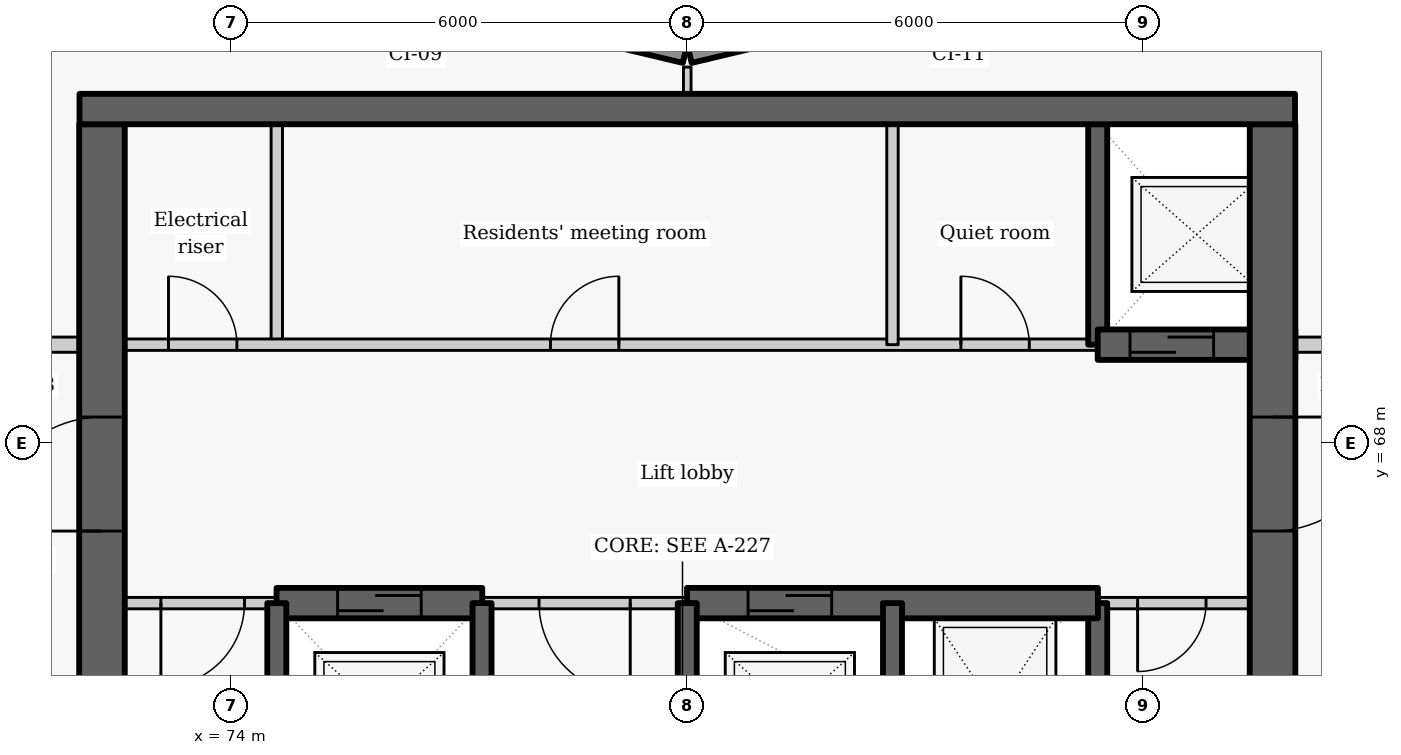
"""IFC4 building model, lengths in metres.
Left out: names, types, materials, properties, quantities, classifications, styles, units other than length and angle.
Written with IfcOpenShell. Run it as: python <this file> out.ifc"""

import sys

from ifc_helpers import new_model, si_unit, direction, frame, frame_2d, origin, place, context, subcontext, project, spatial, rectangle, extrude, element, fill, save


model = new_model("IFC4")
c1 = context("Model", 3, precision=1e-05, world=origin(), true_north=direction((0.0, 1.0)))
c2 = subcontext(c1, "Body", "Model", "MODEL_VIEW")
j1 = project(units=[si_unit("LENGTHUNIT", "METRE"), si_unit("PLANEANGLEUNIT", "RADIAN")], contexts=[c1])
p1 = place(None, origin())
s1 = spatial("IfcSite", under=j1, at=p1, CompositionType="ELEMENT")
p2 = place(p1, origin())
s2 = spatial("IfcBuilding", under=s1, at=p2, CompositionType="ELEMENT")
p3 = place(p2, frame((0.0, 0.0, 150.3)))
s3 = spatial("IfcBuildingStorey", under=s2, at=p3, CompositionType="ELEMENT", Elevation=150.3)
p4 = place(p3, frame((83.186, 73.881, 0.0), z_axis=(0.0, 0.0, 1.0), x_axis=(-0.972773113459, -0.231759508395, 0.0)))
e1 = element("IfcWall", 1, at=p4, inside=s3, PredefinedType="SOLIDWALL", context=c2, shape_type="SweptSolid", body=[
    extrude(rectangle(XDim=3.246, YDim=0.25, at=frame_2d((1.623, 0.0))), origin(), (0.0, 0.0, 1.0), 2.425),
])
p5 = place(p4, frame((0.573, 0.0, 0.9)))
e2 = element("IfcOpeningElement", 2, at=p5, cuts=e1, PredefinedType="OPENING", context=c2, shape_type="SweptSolid", body=[
    extrude(rectangle(XDim=2.1, YDim=1.1, at=frame_2d((1.05, 0.55))), frame((0.0, 0.135, 0.0), z_axis=(0.0, -1.0, 0.0), x_axis=(1.0, 0.0, 0.0)), (0.0, 0.0, 1.0), 0.27),
])
p6 = place(p3, frame((79.971, 73.128, 0.0), z_axis=(0.0, 0.0, 1.0), x_axis=(-0.972773113459, 0.231759508395, 0.0)))
e3 = element("IfcWall", 3, at=p6, inside=s3, PredefinedType="SOLIDWALL", context=c2, shape_type="SweptSolid", body=[
    extrude(rectangle(XDim=3.246, YDim=0.25, at=frame_2d((1.623, 0.0))), origin(), (0.0, 0.0, 1.0), 2.425),
])
p7 = place(p6, frame((0.573, 0.0, 0.9)))
e4 = element("IfcOpeningElement", 4, at=p7, cuts=e3, PredefinedType="OPENING", context=c2, shape_type="SweptSolid", body=[
    extrude(rectangle(XDim=2.1, YDim=1.1, at=frame_2d((1.05, 0.55))), frame((0.0, 0.135, 0.0), z_axis=(0.0, -1.0, 0.0), x_axis=(1.0, 0.0, 0.0)), (0.0, 0.0, 1.0), 0.27),
])
p8 = place(p3, frame((74.6, 69.3, 0.0), z_axis=(0.0, 0.0, 1.0), x_axis=(0.0, 1.0, 0.0)))
e5 = element("IfcWall", 5, at=p8, inside=s3, PredefinedType="PARTITIONING", context=c2, shape_type="SweptSolid", body=[
    extrude(rectangle(XDim=2.9, YDim=0.15, at=frame_2d((1.45, 0.0))), origin(), (0.0, 0.0, 1.0), 3.025),
])
p9 = place(p3, frame((72.0, 69.3, 0.0), z_axis=(0.0, 0.0, 1.0), x_axis=(1.0, 0.0, 0.0)))
e6 = element("IfcWall", 6, at=p9, inside=s3, PredefinedType="PARTITIONING", context=c2, shape_type="SweptSolid", body=[
    extrude(rectangle(XDim=13.4, YDim=0.15, at=frame_2d((6.7, 0.0))), origin(), (0.0, 0.0, 1.0), 3.025),
])
p10 = place(p9, frame((1.175, 0.0, 0.0)))
e7 = element("IfcOpeningElement", 7, at=p10, cuts=e6, PredefinedType="OPENING", context=c2, shape_type="SweptSolid", body=[
    extrude(rectangle(XDim=0.9, YDim=2.1, at=frame_2d((0.45, 1.05))), frame((0.0, 0.085, 0.0), z_axis=(0.0, -1.0, 0.0), x_axis=(1.0, 0.0, 0.0)), (0.0, 0.0, 1.0), 0.17),
])
p11 = place(p9, frame((6.2, 0.0, 0.0)))
e8 = element("IfcOpeningElement", 8, at=p11, cuts=e6, PredefinedType="OPENING", context=c2, shape_type="SweptSolid", body=[
    extrude(rectangle(XDim=0.9, YDim=2.1, at=frame_2d((0.45, 1.05))), frame((0.0, 0.085, 0.0), z_axis=(0.0, -1.0, 0.0), x_axis=(1.0, 0.0, 0.0)), (0.0, 0.0, 1.0), 0.17),
])
p12 = place(p9, frame((11.6, 0.0, 0.0)))
e9 = element("IfcOpeningElement", 9, at=p12, cuts=e6, PredefinedType="OPENING", context=c2, shape_type="SweptSolid", body=[
    extrude(rectangle(XDim=0.9, YDim=2.1, at=frame_2d((0.45, 1.05))), frame((0.0, 0.085, 0.0), z_axis=(0.0, -1.0, 0.0), x_axis=(1.0, 0.0, 0.0)), (0.0, 0.0, 1.0), 0.17),
])
p13 = place(p3, frame((72.3, 63.1, -0.275), z_axis=(0.0, 0.0, 1.0), x_axis=(0.0, 1.0, 0.0)))
e10 = element("IfcWall", 10, at=p13, inside=s3, PredefinedType="SHEAR", context=c2, shape_type="SweptSolid", body=[
    extrude(rectangle(XDim=9.1, YDim=0.6, at=frame_2d((4.55, 0.0))), origin(), (0.0, 0.0, 1.0), 3.3),
])
p14 = place(p13, frame((3.748, 0.0, 0.275)))
e11 = element("IfcOpeningElement", 11, at=p14, cuts=e10, PredefinedType="OPENING", context=c2, shape_type="SweptSolid", body=[
    extrude(rectangle(XDim=1.5, YDim=2.1, at=frame_2d((0.75, 1.05))), frame((0.0, 0.31, 0.0), z_axis=(0.0, -1.0, 0.0), x_axis=(1.0, 0.0, 0.0)), (0.0, 0.0, 1.0), 0.62),
])
p15 = place(p3, frame((85.4, 63.1, -0.275), z_axis=(0.0, 0.0, 1.0), x_axis=(0.0, 1.0, 0.0)))
e12 = element("IfcWall", 12, at=p15, inside=s3, PredefinedType="SHEAR", context=c2, shape_type="SweptSolid", body=[
    extrude(rectangle(XDim=2.8, YDim=0.25, at=frame_2d((1.4, 0.0))), origin(), (0.0, 0.0, 1.0), 3.3),
])
p16 = place(p3, frame((85.4, 69.3, -0.275), z_axis=(0.0, 0.0, 1.0), x_axis=(0.0, 1.0, 0.0)))
e13 = element("IfcWall", 13, at=p16, inside=s3, PredefinedType="SHEAR", context=c2, shape_type="SweptSolid", body=[
    extrude(rectangle(XDim=2.9, YDim=0.25, at=frame_2d((1.45, 0.0))), origin(), (0.0, 0.0, 1.0), 3.3),
])
p17 = place(p3, frame((85.4, 69.3, -0.275), z_axis=(0.0, 0.0, 1.0), x_axis=(1.0, 0.0, 0.0)))
e14 = element("IfcWall", 14, at=p17, inside=s3, PredefinedType="SHEAR", context=c2, shape_type="SweptSolid", body=[
    extrude(rectangle(XDim=2.6, YDim=0.4, at=frame_2d((1.3, 0.0))), origin(), (0.0, 0.0, 1.0), 3.3),
])
p18 = place(p17, frame((0.425, 0.0, 0.275)))
e15 = element("IfcOpeningElement", 15, at=p18, cuts=e14, PredefinedType="OPENING", context=c2, shape_type="SweptSolid", body=[
    extrude(rectangle(XDim=1.1, YDim=2.1, at=frame_2d((0.55, 1.05))), frame((0.0, 0.21, 0.0), z_axis=(0.0, -1.0, 0.0), x_axis=(1.0, 0.0, 0.0)), (0.0, 0.0, 1.0), 0.42),
])
p19 = place(p3, frame((87.7, 72.2, -0.275), z_axis=(0.0, 0.0, 1.0), x_axis=(0.0, -1.0, 0.0)))
e16 = element("IfcWall", 16, at=p19, inside=s3, PredefinedType="SHEAR", context=c2, shape_type="SweptSolid", body=[
    extrude(rectangle(XDim=15.6, YDim=0.6, at=frame_2d((7.8, 0.0))), origin(), (0.0, 0.0, 1.0), 3.3),
])
p20 = place(p19, frame((3.852, 0.0, 0.275)))
e17 = element("IfcOpeningElement", 17, at=p20, cuts=e16, PredefinedType="OPENING", context=c2, shape_type="SweptSolid", body=[
    extrude(rectangle(XDim=1.5, YDim=2.1, at=frame_2d((0.75, 1.05))), frame((0.0, 0.31, 0.0), z_axis=(0.0, -1.0, 0.0), x_axis=(1.0, 0.0, 0.0)), (0.0, 0.0, 1.0), 0.62),
])
p21 = place(p3, frame((82.7, 69.3, 0.0), z_axis=(0.0, 0.0, 1.0), x_axis=(0.0, 1.0, 0.0)))
e18 = element("IfcWall", 18, at=p21, inside=s3, PredefinedType="PARTITIONING", context=c2, shape_type="SweptSolid", body=[
    extrude(rectangle(XDim=2.9, YDim=0.15, at=frame_2d((1.45, 0.0))), origin(), (0.0, 0.0, 1.0), 3.025),
])
p22 = place(p3, frame((74.603, 65.9, 0.0), z_axis=(0.0, 0.0, 1.0), x_axis=(-1.0, 0.0, 0.0)))
e19 = element("IfcWall", 19, at=p22, inside=s3, PredefinedType="PARTITIONING", context=c2, shape_type="SweptSolid", body=[
    extrude(rectangle(XDim=2.603, YDim=0.15, at=frame_2d((1.302, 0.0))), origin(), (0.0, 0.0, 1.0), 3.025),
])
p23 = place(p22, frame((0.428, 0.0, 0.0)))
e20 = element("IfcOpeningElement", 20, at=p23, cuts=e19, PredefinedType="OPENING", context=c2, shape_type="SweptSolid", body=[
    extrude(rectangle(XDim=1.1, YDim=2.1, at=frame_2d((0.55, 1.05))), frame((0.0, 0.085, 0.0), z_axis=(0.0, -1.0, 0.0), x_axis=(1.0, 0.0, 0.0)), (0.0, 0.0, 1.0), 0.17),
])
p24 = place(p3, frame((80.003, 65.9, 0.0), z_axis=(0.0, 0.0, 1.0), x_axis=(-1.0, 0.0, 0.0)))
e21 = element("IfcWall", 21, at=p24, inside=s3, PredefinedType="PARTITIONING", context=c2, shape_type="SweptSolid", body=[
    extrude(rectangle(XDim=2.706, YDim=0.15, at=frame_2d((1.353, 0.0))), origin(), (0.0, 0.0, 1.0), 3.025),
])
p25 = place(p24, frame((0.753, 0.0, 0.0)))
e22 = element("IfcOpeningElement", 22, at=p25, cuts=e21, PredefinedType="OPENING", context=c2, shape_type="SweptSolid", body=[
    extrude(rectangle(XDim=1.2, YDim=2.1, at=frame_2d((0.6, 1.05))), frame((0.0, 0.085, 0.0), z_axis=(0.0, -1.0, 0.0), x_axis=(1.0, 0.0, 0.0)), (0.0, 0.0, 1.0), 0.17),
])
p26 = place(p3, frame((88.0, 65.9, 0.0), z_axis=(0.0, 0.0, 1.0), x_axis=(-1.0, 0.0, 0.0)))
e23 = element("IfcWall", 23, at=p26, inside=s3, PredefinedType="PARTITIONING", context=c2, shape_type="SweptSolid", body=[
    extrude(rectangle(XDim=2.603, YDim=0.15, at=frame_2d((1.302, 0.0))), origin(), (0.0, 0.0, 1.0), 3.025),
])
p27 = place(p26, frame((1.175, 0.0, 0.0)))
e24 = element("IfcOpeningElement", 24, at=p27, cuts=e23, PredefinedType="OPENING", context=c2, shape_type="SweptSolid", body=[
    extrude(rectangle(XDim=0.9, YDim=2.1, at=frame_2d((0.45, 1.05))), frame((0.0, 0.085, 0.0), z_axis=(0.0, -1.0, 0.0), x_axis=(1.0, 0.0, 0.0)), (0.0, 0.0, 1.0), 0.17),
])
p28 = place(p3, frame((74.597, 65.9, -0.275), z_axis=(0.0, 0.0, 1.0), x_axis=(1.0, 0.0, 0.0)))
e25 = element("IfcWall", 25, at=p28, inside=s3, PredefinedType="SHEAR", context=c2, shape_type="SweptSolid", body=[
    extrude(rectangle(XDim=2.706, YDim=0.4, at=frame_2d((1.353, 0.0))), origin(), (0.0, 0.0, 1.0), 3.3),
])
p29 = place(p28, frame((0.803, 0.0, 0.275)))
e26 = element("IfcOpeningElement", 26, at=p29, cuts=e25, PredefinedType="OPENING", context=c2, shape_type="SweptSolid", body=[
    extrude(rectangle(XDim=1.1, YDim=2.1, at=frame_2d((0.55, 1.05))), frame((0.0, 0.21, 0.0), z_axis=(0.0, -1.0, 0.0), x_axis=(1.0, 0.0, 0.0)), (0.0, 0.0, 1.0), 0.42),
])
p30 = place(p3, frame((79.997, 65.9, -0.275), z_axis=(0.0, 0.0, 1.0), x_axis=(1.0, 0.0, 0.0)))
e27 = element("IfcWall", 27, at=p30, inside=s3, PredefinedType="SHEAR", context=c2, shape_type="SweptSolid", body=[
    extrude(rectangle(XDim=5.406, YDim=0.4, at=frame_2d((2.703, 0.0))), origin(), (0.0, 0.0, 1.0), 3.3),
])
p31 = place(p30, frame((0.803, 0.0, 0.275)))
e28 = element("IfcOpeningElement", 28, at=p31, cuts=e27, PredefinedType="OPENING", context=c2, shape_type="SweptSolid", body=[
    extrude(rectangle(XDim=1.1, YDim=2.1, at=frame_2d((0.55, 1.05))), frame((0.0, 0.21, 0.0), z_axis=(0.0, -1.0, 0.0), x_axis=(1.0, 0.0, 0.0)), (0.0, 0.0, 1.0), 0.42),
])
for number, where, z_axis, x_axis in (
    (29, (74.6, 63.1, -0.275), (0.0, 0.0, 1.0), (0.0, 1.0, 0.0)),
    (30, (77.3, 63.1, -0.275), (0.0, 0.0, 1.0), (0.0, 1.0, 0.0)),
    (31, (80.0, 63.1, -0.275), (0.0, 0.0, 1.0), (0.0, 1.0, 0.0)),
    (32, (82.7, 63.1, -0.275), (0.0, 0.0, 1.0), (0.0, 1.0, 0.0)),
):
    element("IfcWall", number, at=place(p3, frame(where, z_axis=z_axis, x_axis=x_axis)), inside=s3, PredefinedType="SHEAR", context=c2, shape_type="SweptSolid", body=[
        extrude(rectangle(XDim=2.8, YDim=0.25, at=frame_2d((1.4, 0.0))), origin(), (0.0, 0.0, 1.0), 3.3),
    ])
for number, where, z_axis, x_axis in (
    (33, (70.45, 69.3, 0.0), (0.0, 0.0, 1.0), (1.0, 0.0, 0.0)),
    (34, (88.0, 69.3, 0.0), (0.0, 0.0, 1.0), (1.0, 0.0, 0.0)),
):
    element("IfcWall", number, at=place(p3, frame(where, z_axis=z_axis, x_axis=x_axis)), inside=s3, PredefinedType="PARTITIONING", context=c2, shape_type="SweptSolid", body=[
        extrude(rectangle(XDim=1.55, YDim=0.2, at=frame_2d((0.775, 0.0))), origin(), (0.0, 0.0, 1.0), 3.025),
    ])
p32 = place(p3, frame((80.0, 72.6, 0.0), z_axis=(0.0, 0.0, 1.0), x_axis=(0.0, 1.0, 0.0)))
e35 = element("IfcWall", 35, at=p32, inside=s3, PredefinedType="PARTITIONING", context=c2, shape_type="SweptSolid", body=[
    extrude(rectangle(XDim=0.352, YDim=0.1, at=frame_2d((0.176, 0.0))), origin(), (0.0, 0.0, 1.0), 3.025),
])
p33 = place(p3, frame((72.004, 72.4, -0.275), z_axis=(0.0, 0.0, 1.0), x_axis=(1.0, 0.0, 0.0)))
e36 = element("IfcWall", 36, at=p33, inside=s3, PredefinedType="SHEAR", context=c2, shape_type="SweptSolid", body=[
    extrude(rectangle(XDim=15.992, YDim=0.4, at=frame_2d((7.996, 0.0))), origin(), (0.0, 0.0, 1.0), 3.3),
])
p34 = place(p10, origin())
e37 = element("IfcDoor", 37, at=p34, inside=s3, OperationType="SINGLE_SWING_LEFT", PredefinedType="DOOR", context=c2, shape_type="SweptSolid", body=[
    extrude(rectangle(XDim=0.9, YDim=2.1, at=frame_2d((0.45, 1.05))), frame((0.0, 0.025, 0.0), z_axis=(0.0, -1.0, 0.0), x_axis=(1.0, 0.0, 0.0)), (0.0, 0.0, 1.0), 0.05),
])
fill(e7, e37)
p35 = place(p18, origin())
e38 = element("IfcDoor", 38, at=p35, inside=s3, OperationType="SLIDING_TO_LEFT", PredefinedType="DOOR", context=c2, shape_type="SweptSolid", body=[
    extrude(rectangle(XDim=1.1, YDim=2.1, at=frame_2d((0.55, 1.05))), frame((0.0, 0.025, 0.0), z_axis=(0.0, -1.0, 0.0), x_axis=(1.0, 0.0, 0.0)), (0.0, 0.0, 1.0), 0.05),
])
fill(e15, e38)
p36 = place(p11, origin())
e39 = element("IfcDoor", 39, at=p36, inside=s3, OperationType="SINGLE_SWING_RIGHT", PredefinedType="DOOR", context=c2, shape_type="SweptSolid", body=[
    extrude(rectangle(XDim=0.9, YDim=2.1, at=frame_2d((0.45, 1.05))), frame((0.0, 0.025, 0.0), z_axis=(0.0, -1.0, 0.0), x_axis=(1.0, 0.0, 0.0)), (0.0, 0.0, 1.0), 0.05),
])
fill(e8, e39)
p37 = place(p12, origin())
e40 = element("IfcDoor", 40, at=p37, inside=s3, OperationType="SINGLE_SWING_LEFT", PredefinedType="DOOR", context=c2, shape_type="SweptSolid", body=[
    extrude(rectangle(XDim=0.9, YDim=2.1, at=frame_2d((0.45, 1.05))), frame((0.0, 0.025, 0.0), z_axis=(0.0, -1.0, 0.0), x_axis=(1.0, 0.0, 0.0)), (0.0, 0.0, 1.0), 0.05),
])
fill(e9, e40)
p38 = place(p23, origin())
e41 = element("IfcDoor", 41, at=p38, inside=s3, OperationType="SINGLE_SWING_RIGHT", PredefinedType="DOOR", context=c2, shape_type="SweptSolid", body=[
    extrude(rectangle(XDim=1.1, YDim=2.1, at=frame_2d((0.55, 1.05))), frame((0.0, 0.025, 0.0), z_axis=(0.0, -1.0, 0.0), x_axis=(1.0, 0.0, 0.0)), (0.0, 0.0, 1.0), 0.05),
])
fill(e20, e41)
p39 = place(p29, origin())
e42 = element("IfcDoor", 42, at=p39, inside=s3, OperationType="SLIDING_TO_LEFT", PredefinedType="DOOR", context=c2, shape_type="SweptSolid", body=[
    extrude(rectangle(XDim=1.1, YDim=2.1, at=frame_2d((0.55, 1.05))), frame((0.0, 0.025, 0.0), z_axis=(0.0, -1.0, 0.0), x_axis=(1.0, 0.0, 0.0)), (0.0, 0.0, 1.0), 0.05),
])
fill(e26, e42)
p40 = place(p25, origin())
e43 = element("IfcDoor", 43, at=p40, inside=s3, OperationType="DOUBLE_DOOR_SINGLE_SWING", PredefinedType="DOOR", context=c2, shape_type="SweptSolid", body=[
    extrude(rectangle(XDim=1.2, YDim=2.1, at=frame_2d((0.6, 1.05))), frame((0.0, 0.025, 0.0), z_axis=(0.0, -1.0, 0.0), x_axis=(1.0, 0.0, 0.0)), (0.0, 0.0, 1.0), 0.05),
])
fill(e22, e43)
p41 = place(p31, origin())
e44 = element("IfcDoor", 44, at=p41, inside=s3, OperationType="SLIDING_TO_LEFT", PredefinedType="DOOR", context=c2, shape_type="SweptSolid", body=[
    extrude(rectangle(XDim=1.1, YDim=2.1, at=frame_2d((0.55, 1.05))), frame((0.0, 0.025, 0.0), z_axis=(0.0, -1.0, 0.0), x_axis=(1.0, 0.0, 0.0)), (0.0, 0.0, 1.0), 0.05),
])
fill(e28, e44)
p42 = place(p27, origin())
e45 = element("IfcDoor", 45, at=p42, inside=s3, OperationType="SINGLE_SWING_RIGHT", PredefinedType="DOOR", context=c2, shape_type="SweptSolid", body=[
    extrude(rectangle(XDim=0.9, YDim=2.1, at=frame_2d((0.45, 1.05))), frame((0.0, 0.025, 0.0), z_axis=(0.0, -1.0, 0.0), x_axis=(1.0, 0.0, 0.0)), (0.0, 0.0, 1.0), 0.05),
])
fill(e24, e45)
p43 = place(p20, origin())
e46 = element("IfcDoor", 46, at=p43, inside=s3, OperationType="DOUBLE_DOOR_SINGLE_SWING", PredefinedType="DOOR", context=c2, shape_type="SweptSolid", body=[
    extrude(rectangle(XDim=1.5, YDim=2.1, at=frame_2d((0.75, 1.05))), frame((0.0, 0.025, 0.0), z_axis=(0.0, -1.0, 0.0), x_axis=(1.0, 0.0, 0.0)), (0.0, 0.0, 1.0), 0.05),
])
fill(e17, e46)
p44 = place(p14, origin())
e47 = element("IfcDoor", 47, at=p44, inside=s3, OperationType="DOUBLE_DOOR_SINGLE_SWING", PredefinedType="DOOR", context=c2, shape_type="SweptSolid", body=[
    extrude(rectangle(XDim=1.5, YDim=2.1, at=frame_2d((0.75, 1.05))), frame((0.0, 0.025, 0.0), z_axis=(0.0, -1.0, 0.0), x_axis=(1.0, 0.0, 0.0)), (0.0, 0.0, 1.0), 0.05),
])
fill(e11, e47)
save(model, sys.argv[1])
